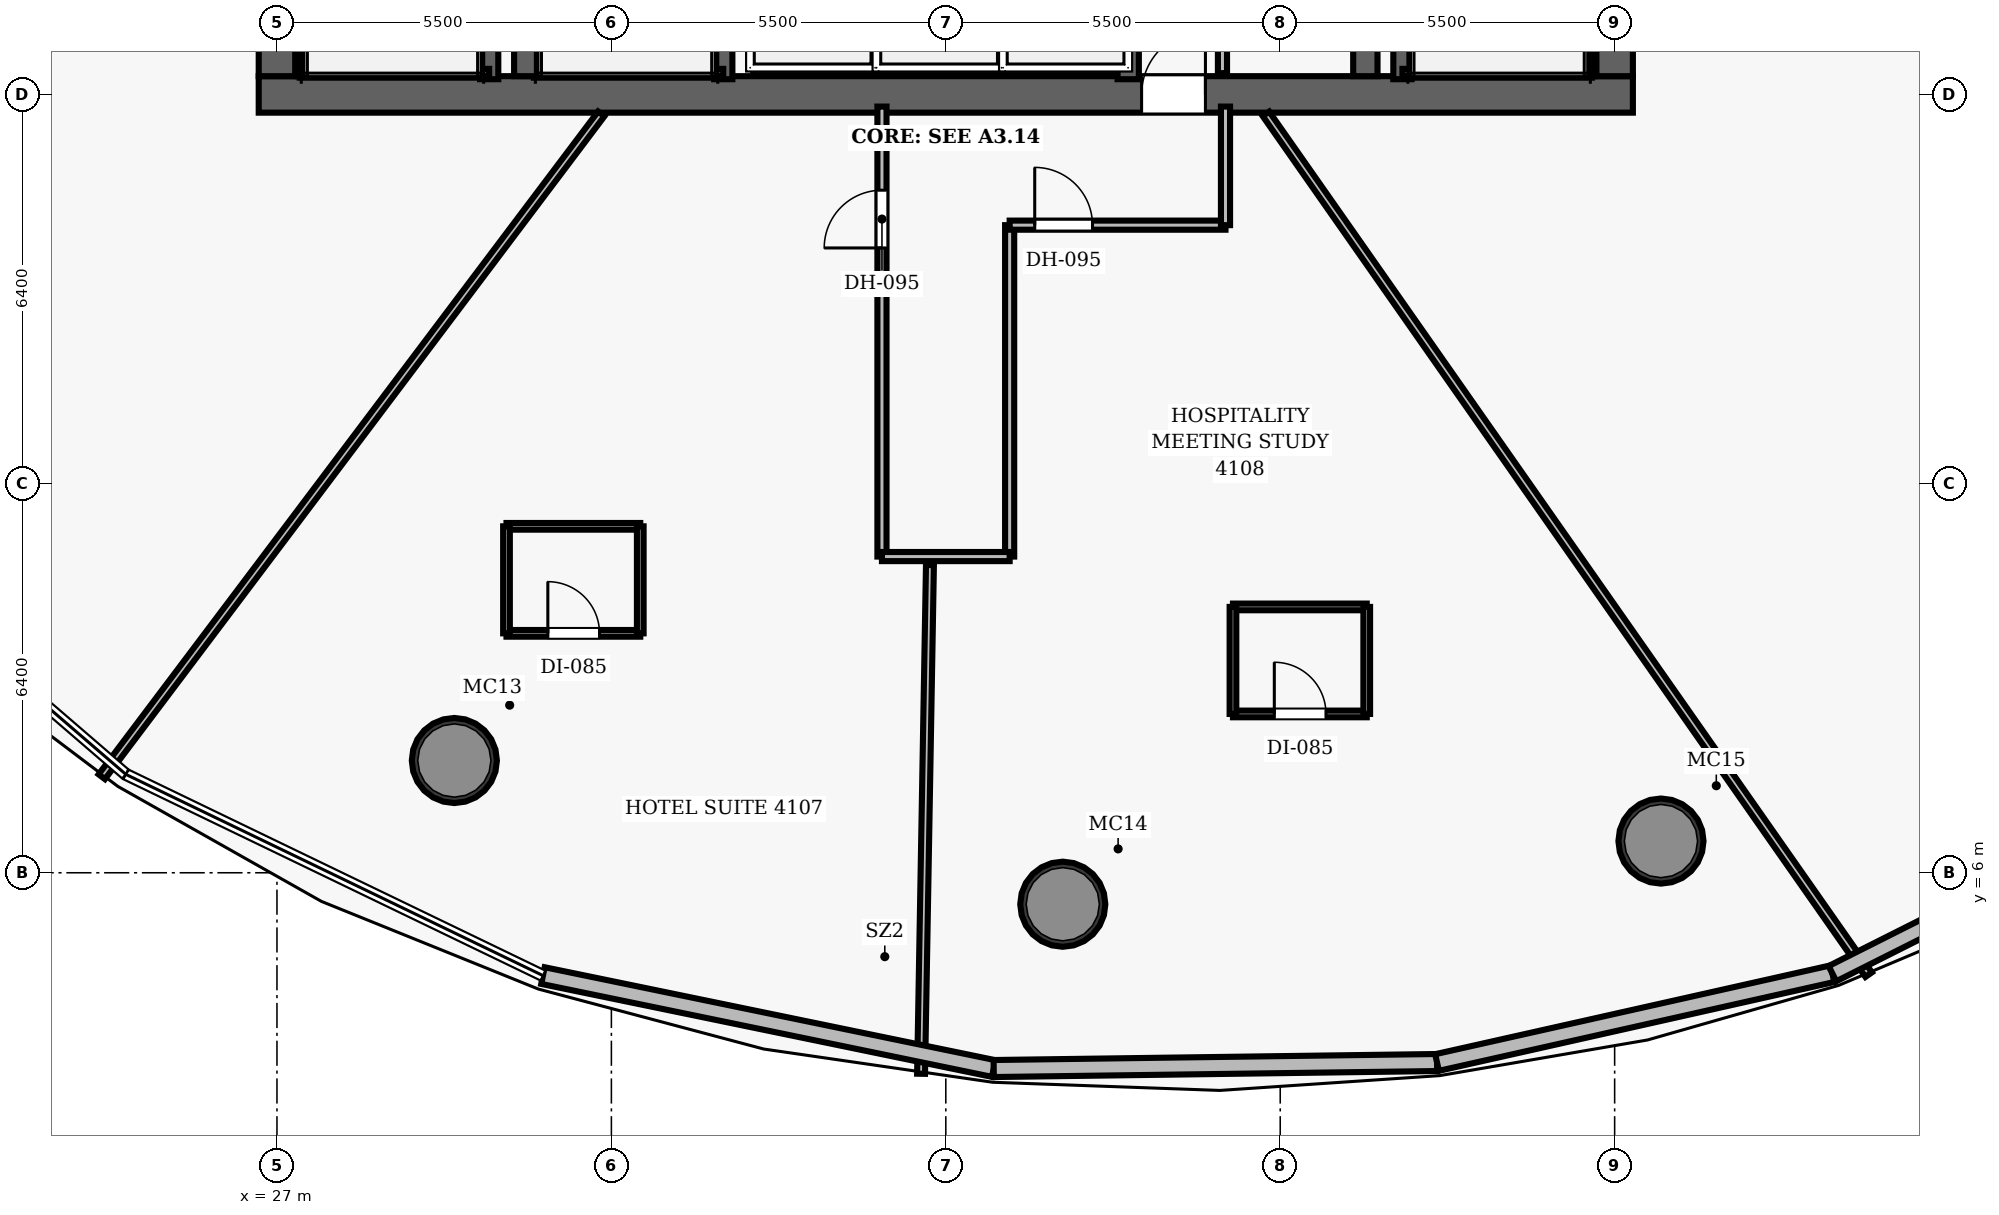
"""IFC4 building model, lengths in metres.
Left out: names, types, materials, properties, quantities, classifications, styles, units other than length and angle.
Written with IfcOpenShell. Run it as: python <this file> out.ifc"""

import sys

from ifc_helpers import new_model, si_unit, direction, frame, frame_2d, origin, origin_2d, place, context, subcontext, project, spatial, rectangle, hollow_circle, extrude, element, fill, save


model = new_model("IFC4")
c1 = context("Model", 3, precision=1e-05, world=origin(), true_north=direction((0.0, 1.0)))
c2 = subcontext(c1, "Body", "Model", "MODEL_VIEW")
j1 = project(units=[si_unit("LENGTHUNIT", "METRE"), si_unit("PLANEANGLEUNIT", "RADIAN")], contexts=[c1])
p1 = place(None, origin())
s1 = spatial("IfcSite", under=j1, at=p1, CompositionType="ELEMENT")
p2 = place(p1, origin())
s2 = spatial("IfcBuilding", under=s1, at=p2, CompositionType="ELEMENT")
p3 = place(p2, frame((0.0, 0.0, 162.3)))
s3 = spatial("IfcBuildingStorey", under=s2, at=p3, CompositionType="ELEMENT", Elevation=162.3)
p4 = place(p3, frame((26.7, 18.8, 0.0), z_axis=(0.0, 0.0, 1.0), x_axis=(1.0, 0.0, 0.0)))
e1 = element("IfcWall", 1, at=p4, inside=s3, PredefinedType="SHEAR", context=c2, shape_type="SweptSolid", body=[
    extrude(rectangle(XDim=22.6, YDim=0.6, at=frame_2d((11.3, 0.0))), origin(), (0.0, 0.0, 1.0), 3.5),
])
p5 = place(p4, frame((14.52, 0.0, 0.0)))
e2 = element("IfcOpeningElement", 2, at=p5, cuts=e1, PredefinedType="OPENING", context=c2, shape_type="SweptSolid", body=[
    extrude(rectangle(XDim=1.05, YDim=2.15, at=frame_2d((0.525, 1.075))), frame((0.0, 0.31, 0.0), z_axis=(0.0, -1.0, 0.0), x_axis=(1.0, 0.0, 0.0)), (0.0, 0.0, 1.0), 0.62),
])
p6 = place(p3, frame((27.0, 19.1, 0.0), z_axis=(0.0, 0.0, 1.0), x_axis=(0.0, 1.0, 0.0)))
e3 = element("IfcWall", 3, at=p6, inside=s3, PredefinedType="SHEAR", context=c2, shape_type="SweptSolid", body=[
    extrude(rectangle(XDim=13.8, YDim=0.6, at=frame_2d((6.9, 0.0))), origin(), (0.0, 0.0, 1.0), 3.5),
])
p7 = place(p6, frame((8.2, 0.0, 0.0)))
e4 = element("IfcOpeningElement", 4, at=p7, cuts=e3, PredefinedType="OPENING", context=c2, shape_type="SweptSolid", body=[
    extrude(rectangle(XDim=1.05, YDim=2.15, at=frame_2d((0.525, 1.075))), frame((0.0, 0.31, 0.0), z_axis=(0.0, -1.0, 0.0), x_axis=(1.0, 0.0, 0.0)), (0.0, 0.0, 1.0), 0.62),
])
p8 = place(p3, frame((49.0, 19.1, 0.0), z_axis=(0.0, 0.0, 1.0), x_axis=(0.0, 1.0, 0.0)))
e5 = element("IfcWall", 5, at=p8, inside=s3, PredefinedType="SHEAR", context=c2, shape_type="SweptSolid", body=[
    extrude(rectangle(XDim=13.8, YDim=0.6, at=frame_2d((6.9, 0.0))), origin(), (0.0, 0.0, 1.0), 3.5),
])
p9 = place(p8, frame((8.2, 0.0, 0.0)))
e6 = element("IfcOpeningElement", 6, at=p9, cuts=e5, PredefinedType="OPENING", context=c2, shape_type="SweptSolid", body=[
    extrude(rectangle(XDim=1.05, YDim=2.15, at=frame_2d((0.525, 1.075))), frame((0.0, 0.31, 0.0), z_axis=(0.0, -1.0, 0.0), x_axis=(1.0, 0.0, 0.0)), (0.0, 0.0, 1.0), 0.62),
])
for number, where, z_axis, x_axis in (
    (7, (31.1, 19.1, 0.0), (0.0, 0.0, 1.0), (0.0, 1.0, 0.0)),
    (8, (44.9, 19.1, 0.0), (0.0, 0.0, 1.0), (0.0, 1.0, 0.0)),
):
    element("IfcWall", number, at=place(p3, frame(where, z_axis=z_axis, x_axis=x_axis)), inside=s3, PredefinedType="SHEAR", context=c2, shape_type="SweptSolid", body=[
        extrude(rectangle(XDim=13.8, YDim=0.4, at=frame_2d((6.9, 0.0))), origin(), (0.0, 0.0, 1.0), 3.5),
    ])
for number, where, z_axis, x_axis in (
    (9, (29.917, 7.846, 0.0), (0.0, 0.0, 1.0), (1.0, 0.0, 0.0)),
    (10, (39.924, 5.483, 0.0), (0.0, 0.0, 1.0), (1.0, 0.0, 0.0)),
    (11, (49.762, 6.521, 0.0), (0.0, 0.0, 1.0), (1.0, 0.0, 0.0)),
):
    element("IfcColumn", number, at=place(p3, frame(where, z_axis=z_axis, x_axis=x_axis)), inside=s3, PredefinedType="COLUMN", context=c2, shape_type="SweptSolid", body=[
        extrude(hollow_circle(Radius=0.7, WallThickness=0.055, at=origin_2d()), origin(), (0.0, 0.0, 1.0), 3.5),
    ])
p10 = place(p3, frame((30.49, 19.05, 0.0), z_axis=(0.0, 0.0, 1.0), x_axis=(0.0, 1.0, 0.0)))
e12 = element("IfcWall", 12, at=p10, inside=s3, PredefinedType="SHEAR", context=c2, shape_type="SweptSolid", body=[
    extrude(rectangle(XDim=7.5, YDim=0.3, at=frame_2d((3.75, 0.0))), origin(), (0.0, 0.0, 1.0), 3.5),
])
p11 = place(p3, frame((27.395, 19.1, 0.0), z_axis=(0.0, 0.0, 1.0), x_axis=(0.0, 1.0, 0.0)))
e13 = element("IfcWall", 13, at=p11, inside=s3, PredefinedType="SHEAR", context=c2, shape_type="SweptSolid", body=[
    extrude(rectangle(XDim=7.45, YDim=0.12, at=frame_2d((3.725, 0.0))), origin(), (0.0, 0.0, 1.0), 3.5),
])
p12 = place(p3, frame((27.395, 19.16, 0.0), z_axis=(0.0, 0.0, 1.0), x_axis=(1.0, 0.0, 0.0)))
e14 = element("IfcWall", 14, at=p12, inside=s3, PredefinedType="SHEAR", context=c2, shape_type="SweptSolid", body=[
    extrude(rectangle(XDim=3.095, YDim=0.12, at=frame_2d((1.547, 0.0))), origin(), (0.0, 0.0, 1.0), 3.5),
])
p13 = place(p3, frame((45.51, 19.05, 0.0), z_axis=(0.0, 0.0, 1.0), x_axis=(0.0, 1.0, 0.0)))
e15 = element("IfcWall", 15, at=p13, inside=s3, PredefinedType="SHEAR", context=c2, shape_type="SweptSolid", body=[
    extrude(rectangle(XDim=7.5, YDim=0.3, at=frame_2d((3.75, 0.0))), origin(), (0.0, 0.0, 1.0), 3.5),
])
p14 = place(p3, frame((48.605, 19.1, 0.0), z_axis=(0.0, 0.0, 1.0), x_axis=(0.0, 1.0, 0.0)))
e16 = element("IfcWall", 16, at=p14, inside=s3, PredefinedType="SHEAR", context=c2, shape_type="SweptSolid", body=[
    extrude(rectangle(XDim=7.45, YDim=0.12, at=frame_2d((3.725, 0.0))), origin(), (0.0, 0.0, 1.0), 3.5),
])
p15 = place(p3, frame((45.51, 19.16, 0.0), z_axis=(0.0, 0.0, 1.0), x_axis=(1.0, 0.0, 0.0)))
e17 = element("IfcWall", 17, at=p15, inside=s3, PredefinedType="SHEAR", context=c2, shape_type="SweptSolid", body=[
    extrude(rectangle(XDim=3.095, YDim=0.12, at=frame_2d((1.547, 0.0))), origin(), (0.0, 0.0, 1.0), 3.5),
])
p16 = place(p3, frame((34.34, 19.05, 0.0), z_axis=(0.0, 0.0, 1.0), x_axis=(0.0, 1.0, 0.0)))
e18 = element("IfcWall", 18, at=p16, inside=s3, PredefinedType="SHEAR", context=c2, shape_type="SweptSolid", body=[
    extrude(rectangle(XDim=7.5, YDim=0.3, at=frame_2d((3.75, 0.0))), origin(), (0.0, 0.0, 1.0), 3.5),
])
p17 = place(p3, frame((31.3, 19.16, 0.0), z_axis=(0.0, 0.0, 1.0), x_axis=(1.0, 0.0, 0.0)))
e19 = element("IfcWall", 19, at=p17, inside=s3, PredefinedType="SHEAR", context=c2, shape_type="SweptSolid", body=[
    extrude(rectangle(XDim=3.04, YDim=0.12, at=frame_2d((1.52, 0.0))), origin(), (0.0, 0.0, 1.0), 3.5),
])
p18 = place(p3, frame((41.0, 19.05, 0.0), z_axis=(0.0, 0.0, 1.0), x_axis=(0.0, 1.0, 0.0)))
e20 = element("IfcWall", 20, at=p18, inside=s3, PredefinedType="SHEAR", context=c2, shape_type="SweptSolid", body=[
    extrude(rectangle(XDim=2.08, YDim=0.35, at=frame_2d((1.04, 0.0))), origin(), (0.0, 0.0, 1.0), 2.565),
])
p19 = place(p3, frame((42.55, 19.15, 0.0), z_axis=(0.0, 0.0, 1.0), x_axis=(0.0, 1.0, 0.0)))
e21 = element("IfcWall", 21, at=p19, inside=s3, PredefinedType="PARTITIONING", context=c2, shape_type="SweptSolid", body=[
    extrude(rectangle(XDim=2.75, YDim=0.15, at=frame_2d((1.375, 0.0))), origin(), (0.0, 0.0, 1.0), 2.565),
])
p20 = place(p19, frame((0.7, 0.0, 0.0)))
e22 = element("IfcOpeningElement", 22, at=p20, cuts=e21, PredefinedType="OPENING", context=c2, shape_type="SweptSolid", body=[
    extrude(rectangle(XDim=0.85, YDim=2.1, at=frame_2d((0.425, 1.05))), frame((0.0, 0.085, 0.0), z_axis=(0.0, -1.0, 0.0), x_axis=(1.0, 0.0, 0.0)), (0.0, 0.0, 1.0), 0.17),
])
p21 = place(p3, frame((36.95, 11.2, 0.0), z_axis=(0.0, 0.0, 1.0), x_axis=(0.0, 1.0, 0.0)))
e23 = element("IfcWall", 23, at=p21, inside=s3, PredefinedType="PARTITIONING", context=c2, shape_type="SweptSolid", body=[
    extrude(rectangle(XDim=7.4, YDim=0.15, at=frame_2d((3.7, 0.0))), origin(), (0.0, 0.0, 1.0), 2.565),
])
p22 = place(p21, frame((5.075, 0.0, 0.0)))
e24 = element("IfcOpeningElement", 24, at=p22, cuts=e23, PredefinedType="OPENING", context=c2, shape_type="SweptSolid", body=[
    extrude(rectangle(XDim=0.95, YDim=2.15, at=frame_2d((0.475, 1.075))), frame((0.0, 0.085, 0.0), z_axis=(0.0, -1.0, 0.0), x_axis=(1.0, 0.0, 0.0)), (0.0, 0.0, 1.0), 0.17),
])
p23 = place(p3, frame((39.05, 11.2, 0.0), z_axis=(0.0, 0.0, 1.0), x_axis=(0.0, 1.0, 0.0)))
e25 = element("IfcWall", 25, at=p23, inside=s3, PredefinedType="PARTITIONING", context=c2, shape_type="SweptSolid", body=[
    extrude(rectangle(XDim=5.45, YDim=0.15, at=frame_2d((2.725, 0.0))), origin(), (0.0, 0.0, 1.0), 2.565),
])
p24 = place(p3, frame((39.05, 16.65, 0.0), z_axis=(0.0, 0.0, 1.0), x_axis=(1.0, 0.0, 0.0)))
e26 = element("IfcWall", 26, at=p24, inside=s3, PredefinedType="PARTITIONING", context=c2, shape_type="SweptSolid", body=[
    extrude(rectangle(XDim=3.55, YDim=0.15, at=frame_2d((1.775, 0.0))), origin(), (0.0, 0.0, 1.0), 2.565),
])
p25 = place(p24, frame((0.413, 0.0, 0.0)))
e27 = element("IfcOpeningElement", 27, at=p25, cuts=e26, PredefinedType="OPENING", context=c2, shape_type="SweptSolid", body=[
    extrude(rectangle(XDim=0.95, YDim=2.15, at=frame_2d((0.475, 1.075))), frame((0.0, 0.085, 0.0), z_axis=(0.0, -1.0, 0.0), x_axis=(1.0, 0.0, 0.0)), (0.0, 0.0, 1.0), 0.17),
])
p26 = place(p3, frame((42.6, 16.65, 0.0), z_axis=(0.0, 0.0, 1.0), x_axis=(0.0, 1.0, 0.0)))
e28 = element("IfcWall", 28, at=p26, inside=s3, PredefinedType="PARTITIONING", context=c2, shape_type="SweptSolid", body=[
    extrude(rectangle(XDim=1.95, YDim=0.15, at=frame_2d((0.975, 0.0))), origin(), (0.0, 0.0, 1.0), 2.565),
])
p27 = place(p3, frame((36.95, 11.2, 0.0), z_axis=(0.0, 0.0, 1.0), x_axis=(1.0, 0.0, 0.0)))
e29 = element("IfcWall", 29, at=p27, inside=s3, PredefinedType="PARTITIONING", context=c2, shape_type="SweptSolid", body=[
    extrude(rectangle(XDim=2.1, YDim=0.15, at=frame_2d((1.05, 0.0))), origin(), (0.0, 0.0, 1.0), 2.565),
])
p28 = place(p3, frame((26.68, 22.539, 0.0), z_axis=(0.0, 0.0, 1.0), x_axis=(-0.95630705824, -0.292364174208, 0.0)))
e30 = element("IfcWall", 30, at=p28, inside=s3, PredefinedType="PARTITIONING", context=c2, shape_type="SweptSolid", body=[
    extrude(rectangle(XDim=13.117, YDim=0.13, at=frame_2d((6.559, 0.0))), origin(), (0.0, 0.0, 1.0), 2.565),
])
p29 = place(p3, frame((32.333, 18.48, 0.0), z_axis=(0.0, 0.0, 1.0), x_axis=(-0.601812874522, -0.798637129151, 0.0)))
e31 = element("IfcWall", 31, at=p29, inside=s3, PredefinedType="PARTITIONING", context=c2, shape_type="SweptSolid", body=[
    extrude(rectangle(XDim=13.649, YDim=0.13, at=frame_2d((6.825, 0.0))), origin(), (0.0, 0.0, 1.0), 2.565),
])
p30 = place(p3, frame((37.739, 11.06, 0.0), z_axis=(0.0, 0.0, 1.0), x_axis=(-0.017448535387, -0.999847762718, 0.0)))
e32 = element("IfcWall", 32, at=p30, inside=s3, PredefinedType="PARTITIONING", context=c2, shape_type="SweptSolid", body=[
    extrude(rectangle(XDim=8.367, YDim=0.13, at=frame_2d((4.184, 0.0))), origin(), (0.0, 0.0, 1.0), 2.565),
])
p31 = place(p3, frame((43.266, 18.48, 0.0), z_axis=(0.0, 0.0, 1.0), x_axis=(0.57357232701, -0.819154921665, 0.0)))
e33 = element("IfcWall", 33, at=p31, inside=s3, PredefinedType="PARTITIONING", context=c2, shape_type="SweptSolid", body=[
    extrude(rectangle(XDim=17.281, YDim=0.13, at=frame_2d((8.641, 0.0))), origin(), (0.0, 0.0, 1.0), 2.565),
])
p32 = place(p3, frame((49.32, 22.102, 0.0), z_axis=(0.0, 0.0, 1.0), x_axis=(0.945519103615, -0.325566620984, 0.0)))
e34 = element("IfcWall", 34, at=p32, inside=s3, PredefinedType="PARTITIONING", context=c2, shape_type="SweptSolid", body=[
    extrude(rectangle(XDim=15.331, YDim=0.13, at=frame_2d((7.666, 0.0))), origin(), (0.0, 0.0, 1.0), 2.565),
])
p33 = place(p3, frame((30.775, 9.937, 0.0), z_axis=(0.0, 0.0, 1.0), x_axis=(1.0, 0.0, 0.0)))
e35 = element("IfcWall", 35, at=p33, inside=s3, PredefinedType="PARTITIONING", context=c2, shape_type="SweptSolid", body=[
    extrude(rectangle(XDim=2.2, YDim=0.11, at=frame_2d((1.1, 0.0))), origin(), (0.0, 0.0, 1.0), 2.565),
])
p34 = place(p33, frame((0.68, 0.0, 0.0)))
e36 = element("IfcOpeningElement", 36, at=p34, cuts=e35, PredefinedType="OPENING", context=c2, shape_type="SweptSolid", body=[
    extrude(rectangle(XDim=0.85, YDim=2.1, at=frame_2d((0.425, 1.05))), frame((0.0, 0.065, 0.0), z_axis=(0.0, -1.0, 0.0), x_axis=(1.0, 0.0, 0.0)), (0.0, 0.0, 1.0), 0.13),
])
p35 = place(p3, frame((30.775, 11.697, 0.0), z_axis=(0.0, 0.0, 1.0), x_axis=(1.0, 0.0, 0.0)))
e37 = element("IfcWall", 37, at=p35, inside=s3, PredefinedType="PARTITIONING", context=c2, shape_type="SweptSolid", body=[
    extrude(rectangle(XDim=2.2, YDim=0.11, at=frame_2d((1.1, 0.0))), origin(), (0.0, 0.0, 1.0), 2.565),
])
for number, where, z_axis, x_axis in (
    (38, (30.775, 9.937, 0.0), (0.0, 0.0, 1.0), (0.0, 1.0, 0.0)),
    (39, (32.975, 9.937, 0.0), (0.0, 0.0, 1.0), (0.0, 1.0, 0.0)),
):
    element("IfcWall", number, at=place(p3, frame(where, z_axis=z_axis, x_axis=x_axis)), inside=s3, PredefinedType="PARTITIONING", context=c2, shape_type="SweptSolid", body=[
        extrude(rectangle(XDim=1.76, YDim=0.11, at=frame_2d((0.88, 0.0))), origin(), (0.0, 0.0, 1.0), 2.565),
    ])
p36 = place(p3, frame((42.723, 8.612, 0.0), z_axis=(0.0, 0.0, 1.0), x_axis=(1.0, 0.0, 0.0)))
e40 = element("IfcWall", 40, at=p36, inside=s3, PredefinedType="PARTITIONING", context=c2, shape_type="SweptSolid", body=[
    extrude(rectangle(XDim=2.2, YDim=0.11, at=frame_2d((1.1, 0.0))), origin(), (0.0, 0.0, 1.0), 2.565),
])
p37 = place(p36, frame((0.68, 0.0, 0.0)))
e41 = element("IfcOpeningElement", 41, at=p37, cuts=e40, PredefinedType="OPENING", context=c2, shape_type="SweptSolid", body=[
    extrude(rectangle(XDim=0.85, YDim=2.1, at=frame_2d((0.425, 1.05))), frame((0.0, 0.065, 0.0), z_axis=(0.0, -1.0, 0.0), x_axis=(1.0, 0.0, 0.0)), (0.0, 0.0, 1.0), 0.13),
])
p38 = place(p3, frame((42.723, 10.372, 0.0), z_axis=(0.0, 0.0, 1.0), x_axis=(1.0, 0.0, 0.0)))
e42 = element("IfcWall", 42, at=p38, inside=s3, PredefinedType="PARTITIONING", context=c2, shape_type="SweptSolid", body=[
    extrude(rectangle(XDim=2.2, YDim=0.11, at=frame_2d((1.1, 0.0))), origin(), (0.0, 0.0, 1.0), 2.565),
])
for number, where, z_axis, x_axis in (
    (43, (42.723, 8.612, 0.0), (0.0, 0.0, 1.0), (0.0, 1.0, 0.0)),
    (44, (44.923, 8.612, 0.0), (0.0, 0.0, 1.0), (0.0, 1.0, 0.0)),
):
    element("IfcWall", number, at=place(p3, frame(where, z_axis=z_axis, x_axis=x_axis)), inside=s3, PredefinedType="PARTITIONING", context=c2, shape_type="SweptSolid", body=[
        extrude(rectangle(XDim=1.76, YDim=0.11, at=frame_2d((0.88, 0.0))), origin(), (0.0, 0.0, 1.0), 2.565),
    ])
p39 = place(p3, frame((38.788, 2.781, 0.0), z_axis=(0.0, 0.0, 1.0), x_axis=(-0.979395914259, 0.201949605427, 0.0)))
e45 = element("IfcWall", 45, at=p39, inside=s3, PredefinedType="SOLIDWALL", context=c2, shape_type="SweptSolid", body=[
    extrude(rectangle(XDim=7.569, YDim=0.28, at=frame_2d((3.785, 0.0))), origin(), (0.0, 0.0, 1.0), 3.15),
])
p40 = place(p3, frame((46.079, 2.879, 0.0), z_axis=(0.0, 0.0, 1.0), x_axis=(-0.999908061986, -0.013559777837, 0.0)))
e46 = element("IfcWall", 46, at=p40, inside=s3, PredefinedType="SOLIDWALL", context=c2, shape_type="SweptSolid", body=[
    extrude(rectangle(XDim=7.292, YDim=0.28, at=frame_2d((3.646, 0.0))), origin(), (0.0, 0.0, 1.0), 3.15),
])
p41 = place(p3, frame((52.582, 4.34, 0.0), z_axis=(0.0, 0.0, 1.0), x_axis=(-0.975681090839, -0.219194910932, 0.0)))
e47 = element("IfcWall", 47, at=p41, inside=s3, PredefinedType="SOLIDWALL", context=c2, shape_type="SweptSolid", body=[
    extrude(rectangle(XDim=6.665, YDim=0.28, at=frame_2d((3.333, 0.0))), origin(), (0.0, 0.0, 1.0), 3.15),
])
p42 = place(p3, frame((57.784, 6.957, 0.0), z_axis=(0.0, 0.0, 1.0), x_axis=(-0.893317552625, -0.449426023026, 0.0)))
e48 = element("IfcWall", 48, at=p42, inside=s3, PredefinedType="SOLIDWALL", context=c2, shape_type="SweptSolid", body=[
    extrude(rectangle(XDim=5.823, YDim=0.28, at=frame_2d((2.911, 0.0))), origin(), (0.0, 0.0, 1.0), 3.15),
])
p43 = place(p5, origin())
e49 = element("IfcDoor", 49, at=p43, inside=s3, OperationType="SINGLE_SWING_RIGHT", PredefinedType="DOOR", context=c2, shape_type="SweptSolid", body=[
    extrude(rectangle(XDim=1.05, YDim=2.15, at=frame_2d((0.525, 1.075))), frame((0.0, 0.025, 0.0), z_axis=(0.0, -1.0, 0.0), x_axis=(1.0, 0.0, 0.0)), (0.0, 0.0, 1.0), 0.05),
])
fill(e2, e49)
p44 = place(p22, origin())
e50 = element("IfcDoor", 50, at=p44, inside=s3, OperationType="SINGLE_SWING_LEFT", PredefinedType="DOOR", context=c2, shape_type="SweptSolid", body=[
    extrude(rectangle(XDim=0.95, YDim=2.15, at=frame_2d((0.475, 1.075))), frame((0.0, 0.025, 0.0), z_axis=(0.0, -1.0, 0.0), x_axis=(1.0, 0.0, 0.0)), (0.0, 0.0, 1.0), 0.05),
])
fill(e24, e50)
p45 = place(p34, origin())
e51 = element("IfcDoor", 51, at=p45, inside=s3, OperationType="SINGLE_SWING_LEFT", PredefinedType="DOOR", context=c2, shape_type="SweptSolid", body=[
    extrude(rectangle(XDim=0.85, YDim=2.1, at=frame_2d((0.425, 1.05))), frame((0.0, 0.025, 0.0), z_axis=(0.0, -1.0, 0.0), x_axis=(1.0, 0.0, 0.0)), (0.0, 0.0, 1.0), 0.05),
])
fill(e36, e51)
p46 = place(p25, origin())
e52 = element("IfcDoor", 52, at=p46, inside=s3, OperationType="SINGLE_SWING_LEFT", PredefinedType="DOOR", context=c2, shape_type="SweptSolid", body=[
    extrude(rectangle(XDim=0.95, YDim=2.15, at=frame_2d((0.475, 1.075))), frame((0.0, 0.025, 0.0), z_axis=(0.0, -1.0, 0.0), x_axis=(1.0, 0.0, 0.0)), (0.0, 0.0, 1.0), 0.05),
])
fill(e27, e52)
p47 = place(p37, origin())
e53 = element("IfcDoor", 53, at=p47, inside=s3, OperationType="SINGLE_SWING_LEFT", PredefinedType="DOOR", context=c2, shape_type="SweptSolid", body=[
    extrude(rectangle(XDim=0.85, YDim=2.1, at=frame_2d((0.425, 1.05))), frame((0.0, 0.025, 0.0), z_axis=(0.0, -1.0, 0.0), x_axis=(1.0, 0.0, 0.0)), (0.0, 0.0, 1.0), 0.05),
])
fill(e41, e53)
save(model, sys.argv[1])
